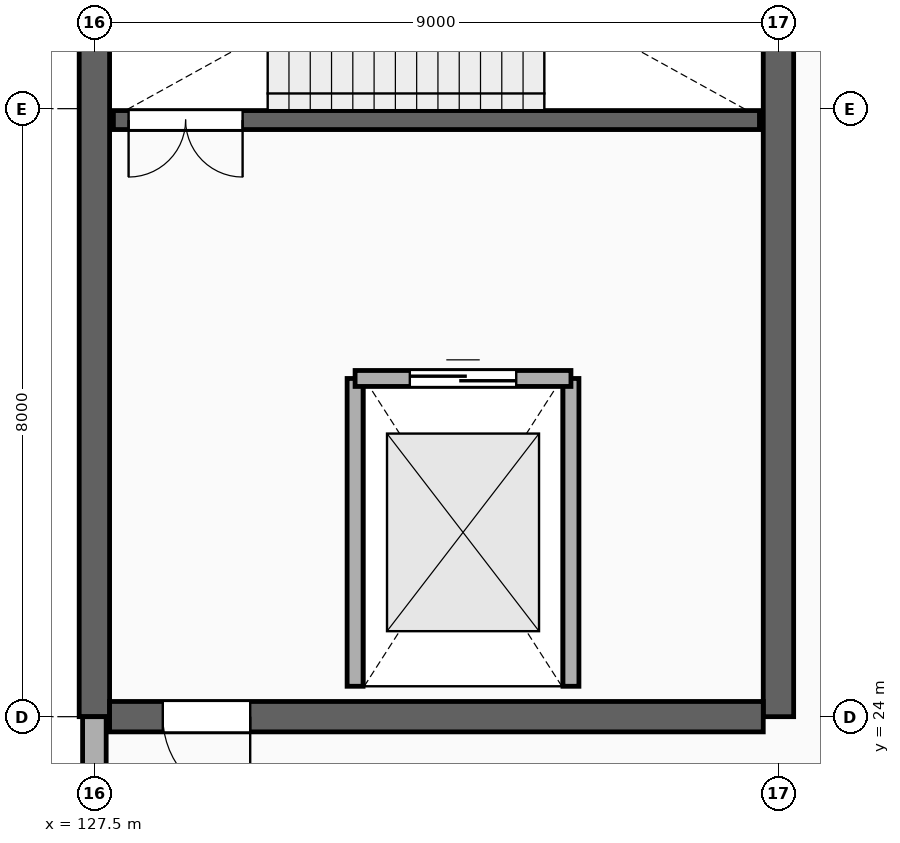
"""IFC4 building model, lengths in metres.
Left out: names, types, materials, properties, quantities, classifications, styles, units other than length and angle.
Written with IfcOpenShell. Run it as: python <this file> out.ifc"""

import sys

from ifc_helpers import new_model, si_unit, direction, frame, frame_2d, origin, place, context, subcontext, project, spatial, rectangle, extrude, element, fill, save


model = new_model("IFC4")
c1 = context("Model", 3, precision=1e-05, world=origin(), true_north=direction((0.0, 1.0)))
c2 = subcontext(c1, "Body", "Model", "MODEL_VIEW")
j1 = project(units=[si_unit("LENGTHUNIT", "METRE"), si_unit("PLANEANGLEUNIT", "RADIAN")], contexts=[c1])
p1 = place(None, origin())
s1 = spatial("IfcSite", under=j1, at=p1, CompositionType="ELEMENT")
p2 = place(p1, origin())
s2 = spatial("IfcBuilding", under=s1, at=p2, CompositionType="ELEMENT")
p3 = place(p2, frame((0.0, 0.0, 5.4)))
s3 = spatial("IfcBuildingStorey", under=s2, at=p3, CompositionType="ELEMENT", Elevation=5.4)
for number, where, z_axis, x_axis in (
    (1, (127.5, 24.0, 0.0), (0.0, 0.0, 1.0), (0.0, 1.0, 0.0)),
    (2, (136.5, 24.0, 0.0), (0.0, 0.0, 1.0), (0.0, 1.0, 0.0)),
):
    element("IfcWall", number, at=place(p3, frame(where, z_axis=z_axis, x_axis=x_axis)), inside=s3, PredefinedType="SHEAR", context=c2, shape_type="SweptSolid", body=[
        extrude(rectangle(XDim=12.8, YDim=0.4, at=frame_2d((6.4, 0.0))), origin(), (0.0, 0.0, 1.0), 4.64),
    ])
p4 = place(p3, frame((127.7, 24.0, 0.0), z_axis=(0.0, 0.0, 1.0), x_axis=(1.0, 0.0, 0.0)))
e3 = element("IfcWall", 3, at=p4, inside=s3, PredefinedType="SHEAR", context=c2, shape_type="SweptSolid", body=[
    extrude(rectangle(XDim=8.6, YDim=0.4, at=frame_2d((4.3, 0.0))), origin(), (0.0, 0.0, 1.0), 4.64),
])
p5 = place(p4, frame((0.7, 0.0, 0.0)))
e4 = element("IfcOpeningElement", 4, at=p5, cuts=e3, PredefinedType="OPENING", context=c2, shape_type="SweptSolid", body=[
    extrude(rectangle(XDim=1.15, YDim=2.2, at=frame_2d((0.575, 1.1))), frame((0.0, 0.212, 0.0), z_axis=(0.0, -1.0, 0.0), x_axis=(1.0, 0.0, 0.0)), (0.0, 0.0, 1.0), 0.424),
])
p6 = place(p3, frame((127.75, 31.85, 0.0), z_axis=(0.0, 0.0, 1.0), x_axis=(1.0, 0.0, 0.0)))
e5 = element("IfcWall", 5, at=p6, inside=s3, PredefinedType="STANDARD", context=c2, shape_type="SweptSolid", body=[
    extrude(rectangle(XDim=8.5, YDim=0.25, at=frame_2d((4.25, 0.0))), origin(), (0.0, 0.0, 1.0), 4.64),
])
p7 = place(p6, frame((0.2, 0.0, 0.0)))
e6 = element("IfcOpeningElement", 6, at=p7, cuts=e5, PredefinedType="OPENING", context=c2, shape_type="SweptSolid", body=[
    extrude(rectangle(XDim=1.5, YDim=2.2, at=frame_2d((0.75, 1.1))), frame((0.0, 0.137, 0.0), z_axis=(0.0, -1.0, 0.0), x_axis=(1.0, 0.0, 0.0)), (0.0, 0.0, 1.0), 0.274),
])
for number, where, z_axis, x_axis in (
    (7, (130.93, 24.4, 0.0), (0.0, 0.0, 1.0), (0.0, 1.0, 0.0)),
    (8, (133.77, 24.4, 0.0), (0.0, 0.0, 1.0), (0.0, 1.0, 0.0)),
):
    element("IfcWall", number, at=place(p3, frame(where, z_axis=z_axis, x_axis=x_axis)), inside=s3, PredefinedType="PARTITIONING", context=c2, shape_type="SweptSolid", body=[
        extrude(rectangle(XDim=4.05, YDim=0.21, at=frame_2d((2.025, 0.0))), origin(), (0.0, 0.0, 1.0), 4.64),
    ])
p8 = place(p3, frame((130.93, 28.45, 0.0), z_axis=(0.0, 0.0, 1.0), x_axis=(1.0, 0.0, 0.0)))
e9 = element("IfcWall", 9, at=p8, inside=s3, PredefinedType="PARTITIONING", context=c2, shape_type="SweptSolid", body=[
    extrude(rectangle(XDim=2.84, YDim=0.21, at=frame_2d((1.42, 0.0))), origin(), (0.0, 0.0, 1.0), 4.64),
])
p9 = place(p8, frame((0.72, 0.0, 0.0)))
e10 = element("IfcOpeningElement", 10, at=p9, cuts=e9, PredefinedType="OPENING", context=c2, shape_type="SweptSolid", body=[
    extrude(rectangle(XDim=1.4, YDim=2.35, at=frame_2d((0.7, 1.175))), frame((0.0, 0.117, 0.0), z_axis=(0.0, -1.0, 0.0), x_axis=(1.0, 0.0, 0.0)), (0.0, 0.0, 1.0), 0.234),
])
p10 = place(p3, frame((127.5, 11.96, 0.0), z_axis=(0.0, 0.0, 1.0), x_axis=(0.0, 1.0, 0.0)))
e11 = element("IfcWall", 11, at=p10, inside=s3, PredefinedType="STANDARD", context=c2, shape_type="SweptSolid", body=[
    extrude(rectangle(XDim=12.04, YDim=0.31, at=frame_2d((6.02, 0.0))), origin(), (0.0, 0.0, 1.0), 4.148),
])
p11 = place(p10, frame((2.21, 0.0, 1.0)))
e12 = element("IfcOpeningElement", 12, at=p11, cuts=e11, PredefinedType="OPENING", context=c2, shape_type="SweptSolid", body=[
    extrude(rectangle(XDim=1.6, YDim=2.2, at=frame_2d((0.8, 1.1))), frame((0.0, 0.167, 0.0), z_axis=(0.0, -1.0, 0.0), x_axis=(1.0, 0.0, 0.0)), (0.0, 0.0, 1.0), 0.334),
])
p12 = place(p10, frame((8.23, 0.0, 1.0)))
e13 = element("IfcOpeningElement", 13, at=p12, cuts=e11, PredefinedType="OPENING", context=c2, shape_type="SweptSolid", body=[
    extrude(rectangle(XDim=1.6, YDim=2.2, at=frame_2d((0.8, 1.1))), frame((0.0, 0.167, 0.0), z_axis=(0.0, -1.0, 0.0), x_axis=(1.0, 0.0, 0.0)), (0.0, 0.0, 1.0), 0.334),
])
p13 = place(p7, frame((1.5, 0.0, 0.0), z_axis=(0.0, 0.0, 1.0), x_axis=(-1.0, 0.0, 0.0)))
e14 = element("IfcDoor", 14, at=p13, inside=s3, OperationType="DOUBLE_DOOR_SINGLE_SWING", PredefinedType="DOOR", context=c2, shape_type="SweptSolid", body=[
    extrude(rectangle(XDim=1.5, YDim=2.2, at=frame_2d((0.75, 1.1))), frame((0.0, 0.025, 0.0), z_axis=(0.0, -1.0, 0.0), x_axis=(1.0, 0.0, 0.0)), (0.0, 0.0, 1.0), 0.05),
])
fill(e6, e14)
p14 = place(p9, origin())
e15 = element("IfcDoor", 15, at=p14, inside=s3, OperationType="DOUBLE_DOOR_SLIDING", PredefinedType="DOOR", context=c2, shape_type="SweptSolid", body=[
    extrude(rectangle(XDim=1.4, YDim=2.35, at=frame_2d((0.7, 1.175))), frame((0.0, 0.025, 0.0), z_axis=(0.0, -1.0, 0.0), x_axis=(1.0, 0.0, 0.0)), (0.0, 0.0, 1.0), 0.05),
])
fill(e10, e15)
p15 = place(p5, frame((1.15, 0.0, 0.0), z_axis=(0.0, 0.0, 1.0), x_axis=(-1.0, 0.0, 0.0)))
e16 = element("IfcDoor", 16, at=p15, inside=s3, OperationType="SINGLE_SWING_RIGHT", PredefinedType="DOOR", context=c2, shape_type="SweptSolid", body=[
    extrude(rectangle(XDim=1.15, YDim=2.2, at=frame_2d((0.575, 1.1))), frame((0.0, 0.025, 0.0), z_axis=(0.0, -1.0, 0.0), x_axis=(1.0, 0.0, 0.0)), (0.0, 0.0, 1.0), 0.05),
])
fill(e4, e16)
save(model, sys.argv[1])
